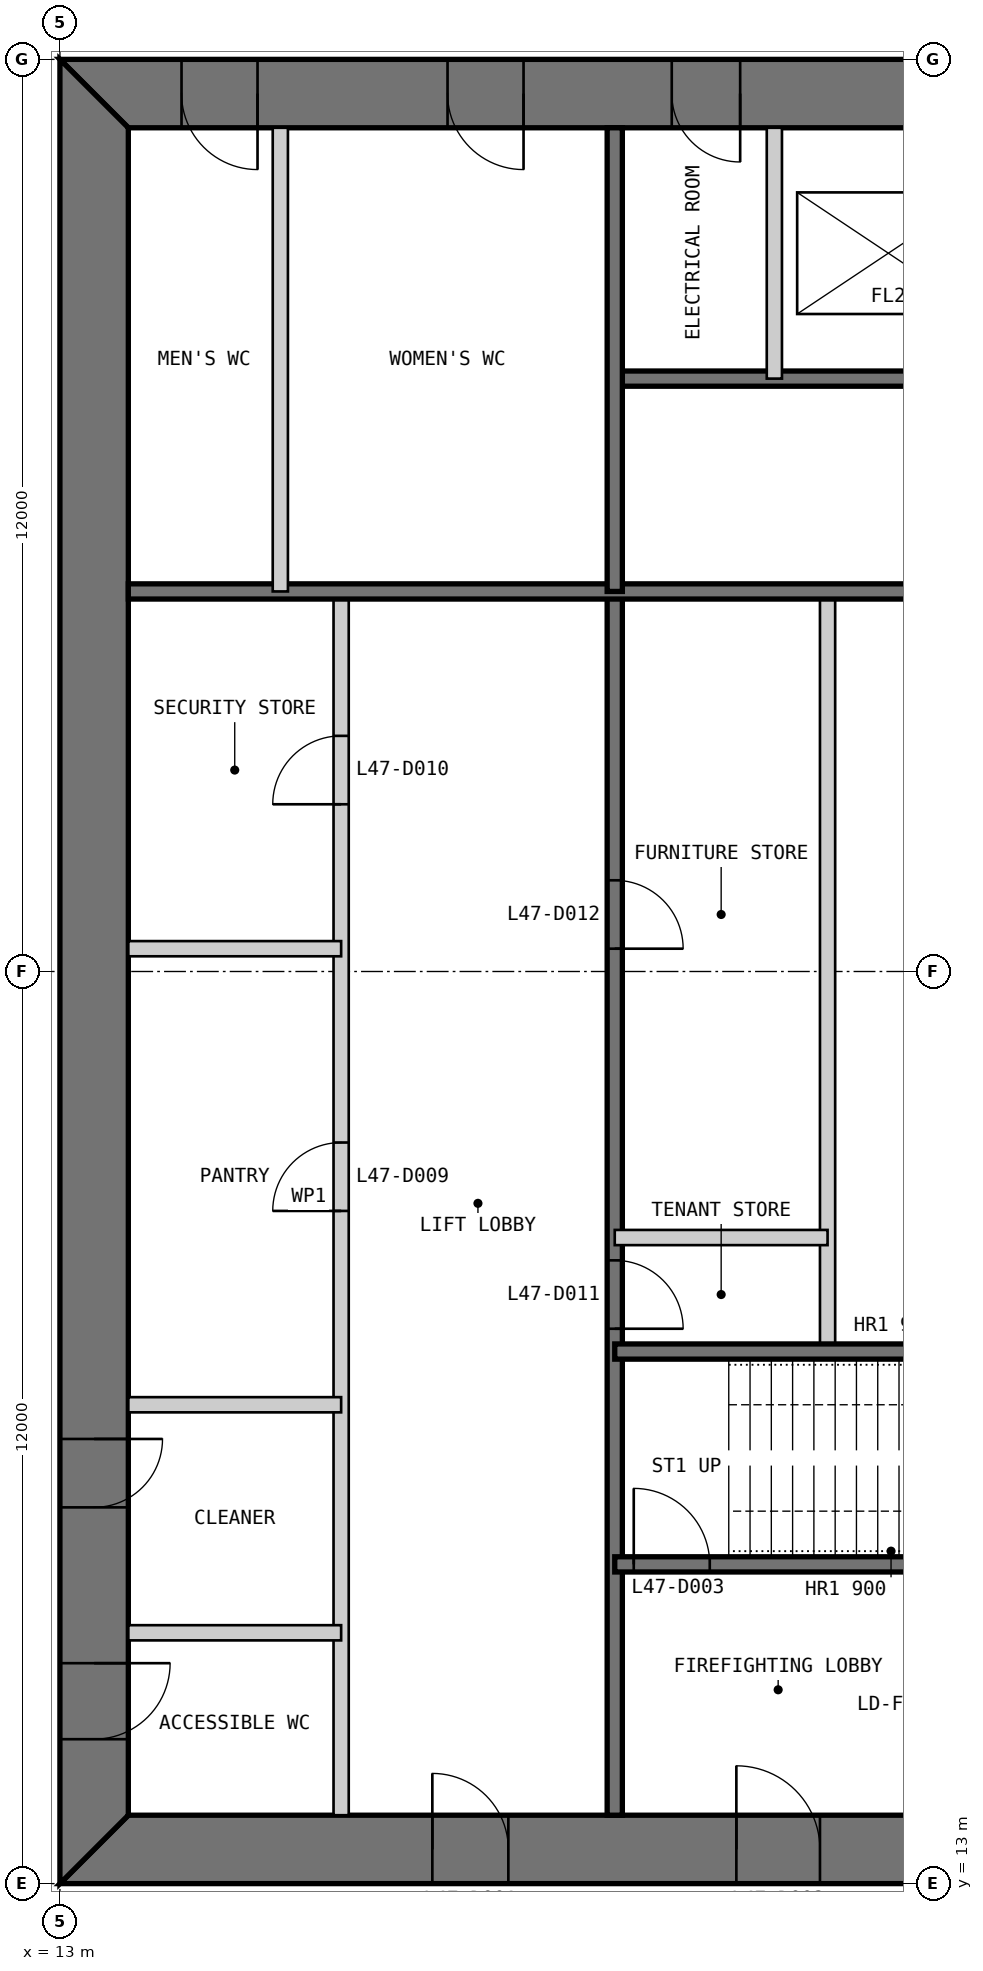
"""IFC4 building model, lengths in metres.
Left out: names, types, materials, properties, quantities, classifications, styles, units other than length and angle.
Written with IfcOpenShell. Run it as: python <this file> out.ifc"""

import sys

from ifc_helpers import new_model, si_unit, direction, frame, frame_2d, origin, place, context, subcontext, project, spatial, polyline, rectangle, outline, extrude, element, fill, save


model = new_model("IFC4")
c1 = context("Model", 3, precision=1e-05, world=origin(), true_north=direction((0.0, 1.0)))
c2 = subcontext(c1, "Body", "Model", "MODEL_VIEW")
j1 = project(units=[si_unit("LENGTHUNIT", "METRE"), si_unit("PLANEANGLEUNIT", "RADIAN")], contexts=[c1])
p1 = place(None, origin())
s1 = spatial("IfcSite", under=j1, at=p1, CompositionType="ELEMENT")
p2 = place(p1, origin())
s2 = spatial("IfcBuilding", under=s1, at=p2, CompositionType="ELEMENT")
p3 = place(p2, frame((0.0, 0.0, 201.8)))
s3 = spatial("IfcBuildingStorey", under=s2, at=p3, CompositionType="ELEMENT", Elevation=201.8)
p4 = place(p3, frame((13.0, 13.45, 0.0), z_axis=(0.0, 0.0, 1.0), x_axis=(1.0, 0.0, 0.0)))
e1 = element("IfcWall", 1, at=p4, inside=s3, PredefinedType="SHEAR", context=c2, shape_type="SweptSolid", body=[
    extrude(outline(polyline([(0.0, -0.45), (24.0, -0.45), (23.1, 0.45), (0.9, 0.45), (0.0, -0.45)])), origin(), (0.0, 0.0, 1.0), 4.0),
])
p5 = place(p4, frame((4.9, 0.0, 0.0)))
e2 = element("IfcOpeningElement", 2, at=p5, cuts=e1, PredefinedType="OPENING", context=c2, shape_type="SweptSolid", body=[
    extrude(rectangle(XDim=1.0, YDim=2.2, at=frame_2d((0.5, 1.1))), frame((0.0, 0.46, 0.0), z_axis=(0.0, -1.0, 0.0), x_axis=(1.0, 0.0, 0.0)), (0.0, 0.0, 1.0), 0.92),
])
p6 = place(p4, frame((8.9, 0.0, 0.0)))
e3 = element("IfcOpeningElement", 3, at=p6, cuts=e1, PredefinedType="OPENING", context=c2, shape_type="SweptSolid", body=[
    extrude(rectangle(XDim=1.1, YDim=2.2, at=frame_2d((0.55, 1.1))), frame((0.0, 0.46, 0.0), z_axis=(0.0, -1.0, 0.0), x_axis=(1.0, 0.0, 0.0)), (0.0, 0.0, 1.0), 0.92),
])
p7 = place(p4, frame((15.05, 0.0, 0.0)))
e4 = element("IfcOpeningElement", 4, at=p7, cuts=e1, PredefinedType="OPENING", context=c2, shape_type="SweptSolid", body=[
    extrude(rectangle(XDim=0.9, YDim=2.2, at=frame_2d((0.45, 1.1))), frame((0.0, 0.46, 0.0), z_axis=(0.0, -1.0, 0.0), x_axis=(1.0, 0.0, 0.0)), (0.0, 0.0, 1.0), 0.92),
])
p8 = place(p4, frame((17.9, 0.0, 0.0)))
e5 = element("IfcOpeningElement", 5, at=p8, cuts=e1, PredefinedType="OPENING", context=c2, shape_type="SweptSolid", body=[
    extrude(rectangle(XDim=1.0, YDim=2.2, at=frame_2d((0.5, 1.1))), frame((0.0, 0.46, 0.0), z_axis=(0.0, -1.0, 0.0), x_axis=(1.0, 0.0, 0.0)), (0.0, 0.0, 1.0), 0.92),
])
p9 = place(p4, frame((21.4, 0.0, 0.0)))
e6 = element("IfcOpeningElement", 6, at=p9, cuts=e1, PredefinedType="OPENING", context=c2, shape_type="SweptSolid", body=[
    extrude(rectangle(XDim=1.0, YDim=2.2, at=frame_2d((0.5, 1.1))), frame((0.0, 0.46, 0.0), z_axis=(0.0, -1.0, 0.0), x_axis=(1.0, 0.0, 0.0)), (0.0, 0.0, 1.0), 0.92),
])
p10 = place(p3, frame((37.0, 36.55, 0.0), z_axis=(0.0, 0.0, 1.0), x_axis=(-1.0, 0.0, 0.0)))
e7 = element("IfcWall", 7, at=p10, inside=s3, PredefinedType="SHEAR", context=c2, shape_type="SweptSolid", body=[
    extrude(outline(polyline([(0.0, -0.45), (24.0, -0.45), (23.1, 0.45), (0.9, 0.45), (0.0, -0.45)])), origin(), (0.0, 0.0, 1.0), 4.0),
])
p11 = place(p10, frame((4.9, 0.0, 0.0)))
e8 = element("IfcOpeningElement", 8, at=p11, cuts=e7, PredefinedType="OPENING", context=c2, shape_type="SweptSolid", body=[
    extrude(rectangle(XDim=1.0, YDim=2.2, at=frame_2d((0.5, 1.1))), frame((0.0, 0.46, 0.0), z_axis=(0.0, -1.0, 0.0), x_axis=(1.0, 0.0, 0.0)), (0.0, 0.0, 1.0), 0.92),
])
p12 = place(p10, frame((8.9, 0.0, 0.0)))
e9 = element("IfcOpeningElement", 9, at=p12, cuts=e7, PredefinedType="OPENING", context=c2, shape_type="SweptSolid", body=[
    extrude(rectangle(XDim=1.1, YDim=2.2, at=frame_2d((0.55, 1.1))), frame((0.0, 0.46, 0.0), z_axis=(0.0, -1.0, 0.0), x_axis=(1.0, 0.0, 0.0)), (0.0, 0.0, 1.0), 0.92),
])
p13 = place(p10, frame((15.05, 0.0, 0.0)))
e10 = element("IfcOpeningElement", 10, at=p13, cuts=e7, PredefinedType="OPENING", context=c2, shape_type="SweptSolid", body=[
    extrude(rectangle(XDim=0.9, YDim=2.2, at=frame_2d((0.45, 1.1))), frame((0.0, 0.46, 0.0), z_axis=(0.0, -1.0, 0.0), x_axis=(1.0, 0.0, 0.0)), (0.0, 0.0, 1.0), 0.92),
])
p14 = place(p10, frame((17.9, 0.0, 0.0)))
e11 = element("IfcOpeningElement", 11, at=p14, cuts=e7, PredefinedType="OPENING", context=c2, shape_type="SweptSolid", body=[
    extrude(rectangle(XDim=1.0, YDim=2.2, at=frame_2d((0.5, 1.1))), frame((0.0, 0.46, 0.0), z_axis=(0.0, -1.0, 0.0), x_axis=(1.0, 0.0, 0.0)), (0.0, 0.0, 1.0), 0.92),
])
p15 = place(p10, frame((21.4, 0.0, 0.0)))
e12 = element("IfcOpeningElement", 12, at=p15, cuts=e7, PredefinedType="OPENING", context=c2, shape_type="SweptSolid", body=[
    extrude(rectangle(XDim=1.0, YDim=2.2, at=frame_2d((0.5, 1.1))), frame((0.0, 0.46, 0.0), z_axis=(0.0, -1.0, 0.0), x_axis=(1.0, 0.0, 0.0)), (0.0, 0.0, 1.0), 0.92),
])
p16 = place(p3, frame((13.45, 36.1, 0.0), z_axis=(0.0, 0.0, 1.0), x_axis=(0.0, -1.0, 0.0)))
e13 = element("IfcWall", 13, at=p16, inside=s3, PredefinedType="SHEAR", context=c2, shape_type="SweptSolid", body=[
    extrude(outline(polyline([(-0.9, -0.45), (23.1, -0.45), (22.2, 0.45), (0.0, 0.45), (-0.9, -0.45)])), origin(), (0.0, 0.0, 1.0), 4.0),
])
p17 = place(p16, frame((20.2, 0.0, 0.0)))
e14 = element("IfcOpeningElement", 14, at=p17, cuts=e13, PredefinedType="OPENING", context=c2, shape_type="SweptSolid", body=[
    extrude(rectangle(XDim=1.0, YDim=2.2, at=frame_2d((0.5, 1.1))), frame((0.0, 0.46, 0.0), z_axis=(0.0, -1.0, 0.0), x_axis=(1.0, 0.0, 0.0)), (0.0, 0.0, 1.0), 0.92),
])
p18 = place(p16, frame((17.25, 0.0, 0.0)))
e15 = element("IfcOpeningElement", 15, at=p18, cuts=e13, PredefinedType="OPENING", context=c2, shape_type="SweptSolid", body=[
    extrude(rectangle(XDim=0.9, YDim=2.2, at=frame_2d((0.45, 1.1))), frame((0.0, 0.46, 0.0), z_axis=(0.0, -1.0, 0.0), x_axis=(1.0, 0.0, 0.0)), (0.0, 0.0, 1.0), 0.92),
])
p19 = place(p3, frame((16.7, 13.9, 0.0), z_axis=(0.0, 0.0, 1.0), x_axis=(0.0, 1.0, 0.0)))
e16 = element("IfcWall", 16, at=p19, inside=s3, PredefinedType="PARTITIONING", context=c2, shape_type="SweptSolid", body=[
    extrude(rectangle(XDim=16.1, YDim=0.2, at=frame_2d((8.05, 0.0))), origin(), (0.0, 0.0, 1.0), 3.8),
])
p20 = place(p19, frame((7.95, 0.0, 0.0)))
e17 = element("IfcOpeningElement", 17, at=p20, cuts=e16, PredefinedType="OPENING", context=c2, shape_type="SweptSolid", body=[
    extrude(rectangle(XDim=0.9, YDim=2.2, at=frame_2d((0.45, 1.1))), frame((0.0, 0.11, 0.0), z_axis=(0.0, -1.0, 0.0), x_axis=(1.0, 0.0, 0.0)), (0.0, 0.0, 1.0), 0.22),
])
p21 = place(p19, frame((13.3, 0.0, 0.0)))
e18 = element("IfcOpeningElement", 18, at=p21, cuts=e16, PredefinedType="OPENING", context=c2, shape_type="SweptSolid", body=[
    extrude(rectangle(XDim=0.9, YDim=2.2, at=frame_2d((0.45, 1.1))), frame((0.0, 0.11, 0.0), z_axis=(0.0, -1.0, 0.0), x_axis=(1.0, 0.0, 0.0)), (0.0, 0.0, 1.0), 0.22),
])
p22 = place(p3, frame((20.3, 13.9, 0.0), z_axis=(0.0, 0.0, 1.0), x_axis=(0.0, 1.0, 0.0)))
e19 = element("IfcWall", 19, at=p22, inside=s3, PredefinedType="SOLIDWALL", context=c2, shape_type="SweptSolid", body=[
    extrude(rectangle(XDim=16.1, YDim=0.2, at=frame_2d((8.05, 0.0))), origin(), (0.0, 0.0, 1.0), 3.8),
])
p23 = place(p22, frame((6.4, 0.0, 0.0)))
e20 = element("IfcOpeningElement", 20, at=p23, cuts=e19, PredefinedType="OPENING", context=c2, shape_type="SweptSolid", body=[
    extrude(rectangle(XDim=0.9, YDim=2.2, at=frame_2d((0.45, 1.1))), frame((0.0, 0.11, 0.0), z_axis=(0.0, -1.0, 0.0), x_axis=(1.0, 0.0, 0.0)), (0.0, 0.0, 1.0), 0.22),
])
p24 = place(p22, frame((11.4, 0.0, 0.0)))
e21 = element("IfcOpeningElement", 21, at=p24, cuts=e19, PredefinedType="OPENING", context=c2, shape_type="SweptSolid", body=[
    extrude(rectangle(XDim=0.9, YDim=2.2, at=frame_2d((0.45, 1.1))), frame((0.0, 0.11, 0.0), z_axis=(0.0, -1.0, 0.0), x_axis=(1.0, 0.0, 0.0)), (0.0, 0.0, 1.0), 0.22),
])
p25 = place(p3, frame((23.1, 20.0, 0.0), z_axis=(0.0, 0.0, 1.0), x_axis=(0.0, 1.0, 0.0)))
e22 = element("IfcWall", 22, at=p25, inside=s3, PredefinedType="PARTITIONING", context=c2, shape_type="SweptSolid", body=[
    extrude(rectangle(XDim=10.0, YDim=0.2, at=frame_2d((5.0, 0.0))), origin(), (0.0, 0.0, 1.0), 3.8),
])
p26 = place(p3, frame((20.3, 17.2, 0.0), z_axis=(0.0, 0.0, 1.0), x_axis=(1.0, 0.0, 0.0)))
e23 = element("IfcWall", 23, at=p26, inside=s3, PredefinedType="SOLIDWALL", context=c2, shape_type="SweptSolid", body=[
    extrude(rectangle(XDim=9.4, YDim=0.2, at=frame_2d((4.7, 0.0))), origin(), (0.0, 0.0, 1.0), 3.8),
])
p27 = place(p26, frame((0.25, 0.0, 0.0)))
e24 = element("IfcOpeningElement", 24, at=p27, cuts=e23, PredefinedType="OPENING", context=c2, shape_type="SweptSolid", body=[
    extrude(rectangle(XDim=1.0, YDim=2.2, at=frame_2d((0.5, 1.1))), frame((0.0, 0.11, 0.0), z_axis=(0.0, -1.0, 0.0), x_axis=(1.0, 0.0, 0.0)), (0.0, 0.0, 1.0), 0.22),
])
p28 = place(p3, frame((20.3, 20.0, 0.0), z_axis=(0.0, 0.0, 1.0), x_axis=(1.0, 0.0, 0.0)))
e25 = element("IfcWall", 25, at=p28, inside=s3, PredefinedType="SOLIDWALL", context=c2, shape_type="SweptSolid", body=[
    extrude(rectangle(XDim=15.8, YDim=0.2, at=frame_2d((7.9, 0.0))), origin(), (0.0, 0.0, 1.0), 3.8),
])
for number, where, z_axis, x_axis in (
    (26, (13.9, 16.3, 0.0), (0.0, 0.0, 1.0), (1.0, 0.0, 0.0)),
    (27, (13.9, 19.3, 0.0), (0.0, 0.0, 1.0), (1.0, 0.0, 0.0)),
    (28, (13.9, 25.3, 0.0), (0.0, 0.0, 1.0), (1.0, 0.0, 0.0)),
    (29, (20.3, 21.5, 0.0), (0.0, 0.0, 1.0), (1.0, 0.0, 0.0)),
):
    element("IfcWall", number, at=place(p3, frame(where, z_axis=z_axis, x_axis=x_axis)), inside=s3, PredefinedType="PARTITIONING", context=c2, shape_type="SweptSolid", body=[
        extrude(rectangle(XDim=2.8, YDim=0.2, at=frame_2d((1.4, 0.0))), origin(), (0.0, 0.0, 1.0), 3.8),
    ])
p29 = place(p3, frame((29.7, 32.8, 0.0), z_axis=(0.0, 0.0, 1.0), x_axis=(-1.0, 0.0, 0.0)))
e30 = element("IfcWall", 30, at=p29, inside=s3, PredefinedType="SOLIDWALL", context=c2, shape_type="SweptSolid", body=[
    extrude(rectangle(XDim=9.4, YDim=0.2, at=frame_2d((4.7, 0.0))), origin(), (0.0, 0.0, 1.0), 3.8),
])
p30 = place(p29, frame((0.25, 0.0, 0.0)))
e31 = element("IfcOpeningElement", 31, at=p30, cuts=e30, PredefinedType="OPENING", context=c2, shape_type="SweptSolid", body=[
    extrude(rectangle(XDim=1.0, YDim=2.2, at=frame_2d((0.5, 1.1))), frame((0.0, 0.11, 0.0), z_axis=(0.0, -1.0, 0.0), x_axis=(1.0, 0.0, 0.0)), (0.0, 0.0, 1.0), 0.22),
])
p31 = place(p3, frame((29.7, 30.0, 0.0), z_axis=(0.0, 0.0, 1.0), x_axis=(-1.0, 0.0, 0.0)))
e32 = element("IfcWall", 32, at=p31, inside=s3, PredefinedType="SOLIDWALL", context=c2, shape_type="SweptSolid", body=[
    extrude(rectangle(XDim=15.8, YDim=0.2, at=frame_2d((7.9, 0.0))), origin(), (0.0, 0.0, 1.0), 3.8),
])
p32 = place(p3, frame((22.4, 36.1, 0.0), z_axis=(0.0, 0.0, 1.0), x_axis=(0.0, -1.0, 0.0)))
e33 = element("IfcWall", 33, at=p32, inside=s3, PredefinedType="PARTITIONING", context=c2, shape_type="SweptSolid", body=[
    extrude(rectangle(XDim=3.3, YDim=0.2, at=frame_2d((1.65, 0.0))), origin(), (0.0, 0.0, 1.0), 3.8),
])
p33 = place(p3, frame((20.3, 36.1, 0.0), z_axis=(0.0, 0.0, 1.0), x_axis=(0.0, -1.0, 0.0)))
e34 = element("IfcWall", 34, at=p33, inside=s3, PredefinedType="SOLIDWALL", context=c2, shape_type="SweptSolid", body=[
    extrude(rectangle(XDim=6.1, YDim=0.2, at=frame_2d((3.05, 0.0))), origin(), (0.0, 0.0, 1.0), 3.8),
])
p34 = place(p3, frame((15.9, 36.1, 0.0), z_axis=(0.0, 0.0, 1.0), x_axis=(0.0, -1.0, 0.0)))
e35 = element("IfcWall", 35, at=p34, inside=s3, PredefinedType="PARTITIONING", context=c2, shape_type="SweptSolid", body=[
    extrude(rectangle(XDim=6.1, YDim=0.2, at=frame_2d((3.05, 0.0))), origin(), (0.0, 0.0, 1.0), 3.8),
])
p35 = place(p5, origin())
e36 = element("IfcDoor", 36, at=p35, inside=s3, OperationType="SINGLE_SWING_LEFT", PredefinedType="DOOR", context=c2, shape_type="SweptSolid", body=[
    extrude(rectangle(XDim=1.0, YDim=2.2, at=frame_2d((0.5, 1.1))), frame((0.0, 0.025, 0.0), z_axis=(0.0, -1.0, 0.0), x_axis=(1.0, 0.0, 0.0)), (0.0, 0.0, 1.0), 0.05),
    extrude(outline(polyline([(0.0, 0.0), (0.04, 0.0), (0.04, 2.16), (0.96, 2.16), (0.96, 0.0), (1.0, 0.0), (1.0, 2.2), (0.0, 2.2), (0.0, 0.0)])), frame((0.0, 0.3, 0.0), z_axis=(0.0, -1.0, 0.0), x_axis=(1.0, 0.0, 0.0)), (0.0, 0.0, 1.0), 0.6),
])
fill(e2, e36)
p36 = place(p6, origin())
e37 = element("IfcDoor", 37, at=p36, inside=s3, OperationType="SINGLE_SWING_LEFT", PredefinedType="DOOR", context=c2, shape_type="SweptSolid", body=[
    extrude(rectangle(XDim=1.1, YDim=2.2, at=frame_2d((0.55, 1.1))), frame((0.0, 0.025, 0.0), z_axis=(0.0, -1.0, 0.0), x_axis=(1.0, 0.0, 0.0)), (0.0, 0.0, 1.0), 0.05),
    extrude(outline(polyline([(0.0, 0.0), (0.04, 0.0), (0.04, 2.16), (1.06, 2.16), (1.06, 0.0), (1.1, 0.0), (1.1, 2.2), (0.0, 2.2), (0.0, 0.0)])), frame((0.0, 0.3, 0.0), z_axis=(0.0, -1.0, 0.0), x_axis=(1.0, 0.0, 0.0)), (0.0, 0.0, 1.0), 0.6),
])
fill(e3, e37)
p37 = place(p27, origin())
e38 = element("IfcDoor", 38, at=p37, inside=s3, OperationType="SINGLE_SWING_LEFT", PredefinedType="DOOR", context=c2, shape_type="SweptSolid", body=[
    extrude(rectangle(XDim=1.0, YDim=2.2, at=frame_2d((0.5, 1.1))), frame((0.0, 0.025, 0.0), z_axis=(0.0, -1.0, 0.0), x_axis=(1.0, 0.0, 0.0)), (0.0, 0.0, 1.0), 0.05),
])
fill(e24, e38)
p38 = place(p17, origin())
e39 = element("IfcDoor", 39, at=p38, inside=s3, OperationType="SINGLE_SWING_LEFT", PredefinedType="DOOR", context=c2, shape_type="SweptSolid", body=[
    extrude(rectangle(XDim=1.0, YDim=2.2, at=frame_2d((0.5, 1.1))), frame((0.0, 0.025, 0.0), z_axis=(0.0, -1.0, 0.0), x_axis=(1.0, 0.0, 0.0)), (0.0, 0.0, 1.0), 0.05),
    extrude(outline(polyline([(0.0, 0.0), (0.04, 0.0), (0.04, 2.16), (0.96, 2.16), (0.96, 0.0), (1.0, 0.0), (1.0, 2.2), (0.0, 2.2), (0.0, 0.0)])), frame((0.0, 0.3, 0.0), z_axis=(0.0, -1.0, 0.0), x_axis=(1.0, 0.0, 0.0)), (0.0, 0.0, 1.0), 0.6),
])
fill(e14, e39)
p39 = place(p18, origin())
e40 = element("IfcDoor", 40, at=p39, inside=s3, OperationType="SINGLE_SWING_LEFT", PredefinedType="DOOR", context=c2, shape_type="SweptSolid", body=[
    extrude(rectangle(XDim=0.9, YDim=2.2, at=frame_2d((0.45, 1.1))), frame((0.0, 0.025, 0.0), z_axis=(0.0, -1.0, 0.0), x_axis=(1.0, 0.0, 0.0)), (0.0, 0.0, 1.0), 0.05),
    extrude(outline(polyline([(0.0, 0.0), (0.04, 0.0), (0.04, 2.16), (0.86, 2.16), (0.86, 0.0), (0.9, 0.0), (0.9, 2.2), (0.0, 2.2), (0.0, 0.0)])), frame((0.0, 0.3, 0.0), z_axis=(0.0, -1.0, 0.0), x_axis=(1.0, 0.0, 0.0)), (0.0, 0.0, 1.0), 0.6),
])
fill(e15, e40)
p40 = place(p20, origin())
e41 = element("IfcDoor", 41, at=p40, inside=s3, OperationType="SINGLE_SWING_LEFT", PredefinedType="DOOR", context=c2, shape_type="SweptSolid", body=[
    extrude(rectangle(XDim=0.9, YDim=2.2, at=frame_2d((0.45, 1.1))), frame((0.0, 0.025, 0.0), z_axis=(0.0, -1.0, 0.0), x_axis=(1.0, 0.0, 0.0)), (0.0, 0.0, 1.0), 0.05),
])
fill(e17, e41)
p41 = place(p21, origin())
e42 = element("IfcDoor", 42, at=p41, inside=s3, OperationType="SINGLE_SWING_LEFT", PredefinedType="DOOR", context=c2, shape_type="SweptSolid", body=[
    extrude(rectangle(XDim=0.9, YDim=2.2, at=frame_2d((0.45, 1.1))), frame((0.0, 0.025, 0.0), z_axis=(0.0, -1.0, 0.0), x_axis=(1.0, 0.0, 0.0)), (0.0, 0.0, 1.0), 0.05),
])
fill(e18, e42)
p42 = place(p23, frame((0.9, 0.0, 0.0), z_axis=(0.0, 0.0, 1.0), x_axis=(-1.0, 0.0, 0.0)))
e43 = element("IfcDoor", 43, at=p42, inside=s3, OperationType="SINGLE_SWING_RIGHT", PredefinedType="DOOR", context=c2, shape_type="SweptSolid", body=[
    extrude(rectangle(XDim=0.9, YDim=2.2, at=frame_2d((0.45, 1.1))), frame((0.0, 0.025, 0.0), z_axis=(0.0, -1.0, 0.0), x_axis=(1.0, 0.0, 0.0)), (0.0, 0.0, 1.0), 0.05),
])
fill(e20, e43)
p43 = place(p24, frame((0.9, 0.0, 0.0), z_axis=(0.0, 0.0, 1.0), x_axis=(-1.0, 0.0, 0.0)))
e44 = element("IfcDoor", 44, at=p43, inside=s3, OperationType="SINGLE_SWING_RIGHT", PredefinedType="DOOR", context=c2, shape_type="SweptSolid", body=[
    extrude(rectangle(XDim=0.9, YDim=2.2, at=frame_2d((0.45, 1.1))), frame((0.0, 0.025, 0.0), z_axis=(0.0, -1.0, 0.0), x_axis=(1.0, 0.0, 0.0)), (0.0, 0.0, 1.0), 0.05),
])
fill(e21, e44)
p44 = place(p13, origin())
e45 = element("IfcDoor", 45, at=p44, inside=s3, OperationType="SINGLE_SWING_LEFT", PredefinedType="DOOR", context=c2, shape_type="SweptSolid", body=[
    extrude(rectangle(XDim=0.9, YDim=2.2, at=frame_2d((0.45, 1.1))), frame((0.0, 0.025, 0.0), z_axis=(0.0, -1.0, 0.0), x_axis=(1.0, 0.0, 0.0)), (0.0, 0.0, 1.0), 0.05),
    extrude(outline(polyline([(0.0, 0.0), (0.04, 0.0), (0.04, 2.16), (0.86, 2.16), (0.86, 0.0), (0.9, 0.0), (0.9, 2.2), (0.0, 2.2), (0.0, 0.0)])), frame((0.0, 0.3, 0.0), z_axis=(0.0, -1.0, 0.0), x_axis=(1.0, 0.0, 0.0)), (0.0, 0.0, 1.0), 0.6),
])
fill(e10, e45)
p45 = place(p14, origin())
e46 = element("IfcDoor", 46, at=p45, inside=s3, OperationType="SINGLE_SWING_LEFT", PredefinedType="DOOR", context=c2, shape_type="SweptSolid", body=[
    extrude(rectangle(XDim=1.0, YDim=2.2, at=frame_2d((0.5, 1.1))), frame((0.0, 0.025, 0.0), z_axis=(0.0, -1.0, 0.0), x_axis=(1.0, 0.0, 0.0)), (0.0, 0.0, 1.0), 0.05),
    extrude(outline(polyline([(0.0, 0.0), (0.04, 0.0), (0.04, 2.16), (0.96, 2.16), (0.96, 0.0), (1.0, 0.0), (1.0, 2.2), (0.0, 2.2), (0.0, 0.0)])), frame((0.0, 0.3, 0.0), z_axis=(0.0, -1.0, 0.0), x_axis=(1.0, 0.0, 0.0)), (0.0, 0.0, 1.0), 0.6),
])
fill(e11, e46)
p46 = place(p15, origin())
e47 = element("IfcDoor", 47, at=p46, inside=s3, OperationType="SINGLE_SWING_LEFT", PredefinedType="DOOR", context=c2, shape_type="SweptSolid", body=[
    extrude(rectangle(XDim=1.0, YDim=2.2, at=frame_2d((0.5, 1.1))), frame((0.0, 0.025, 0.0), z_axis=(0.0, -1.0, 0.0), x_axis=(1.0, 0.0, 0.0)), (0.0, 0.0, 1.0), 0.05),
    extrude(outline(polyline([(0.0, 0.0), (0.04, 0.0), (0.04, 2.16), (0.96, 2.16), (0.96, 0.0), (1.0, 0.0), (1.0, 2.2), (0.0, 2.2), (0.0, 0.0)])), frame((0.0, 0.3, 0.0), z_axis=(0.0, -1.0, 0.0), x_axis=(1.0, 0.0, 0.0)), (0.0, 0.0, 1.0), 0.6),
])
fill(e12, e47)
save(model, sys.argv[1])
